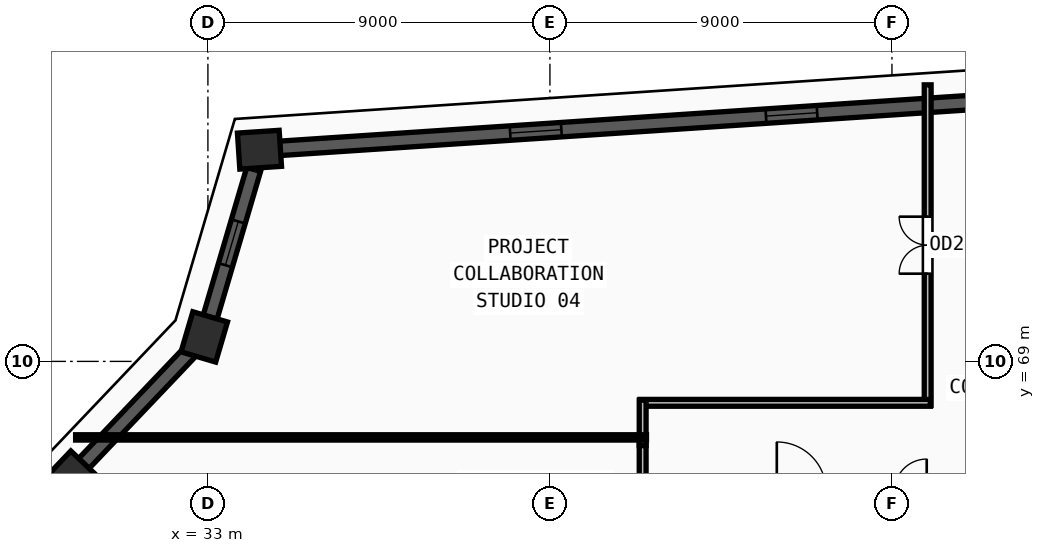
"""IFC4 building model, lengths in metres.
Left out: names, types, materials, properties, quantities, classifications, styles, units other than length and angle.
Written with IfcOpenShell. Run it as: python <this file> out.ifc"""

import sys

from ifc_helpers import new_model, si_unit, direction, frame, frame_2d, origin, origin_2d, place, context, subcontext, project, spatial, rectangle, extrude, source, transform, mapped, element, fill, save


model = new_model("IFC4")
c1 = context("Model", 3, precision=1e-05, world=origin(), true_north=direction((0.0, 1.0)))
c2 = subcontext(c1, "Body", "Model", "MODEL_VIEW")
j1 = project(units=[si_unit("LENGTHUNIT", "METRE"), si_unit("PLANEANGLEUNIT", "RADIAN")], contexts=[c1])
p1 = place(None, origin())
s1 = spatial("IfcSite", under=j1, at=p1, CompositionType="ELEMENT")
p2 = place(p1, origin())
s2 = spatial("IfcBuilding", under=s1, at=p2, CompositionType="ELEMENT")
p3 = place(p2, frame((0.0, 0.0, 286.5)))
s3 = spatial("IfcBuildingStorey", under=s2, at=p3, CompositionType="ELEMENT", Elevation=286.5)
m1 = source(origin(), c2, "Body", "SweptSolid", [
    extrude(rectangle(XDim=1.1, YDim=0.95, at=origin_2d()), origin(), (0.0, 0.0, 1.0), 3.75),
])
for number, where, z_axis, x_axis in (
    (1, (29.358, 65.917, 0.0), (0.0, 0.0, 1.0), (0.689, 0.724, 0.0)),
    (2, (32.904, 69.644, 0.0), (0.0, 0.0, 1.0), (0.283, 0.959, 0.0)),
    (3, (34.357, 74.57, 0.0), (0.0, 0.0, 1.0), (0.998, 0.066, 0.0)),
):
    element("IfcColumn", number, at=place(p3, frame(where, z_axis=z_axis, x_axis=x_axis)), inside=s3, PredefinedType="COLUMN", context=c2, shape_type="MappedRepresentation", body=[
        mapped(m1, transform((0.0, 0.0, 0.0), x_axis=(1.0, 0.0, 0.0), y_axis=(0.0, 1.0, 0.0), z_axis=(0.0, 0.0, 1.0), scale=1.0)),
    ])
p4 = place(p3, frame((61.821, 76.391, 0.0), z_axis=(0.0, 0.0, 1.0), x_axis=(-0.997809311933, -0.06615570285, 0.0)))
e4 = element("IfcWall", 4, at=p4, inside=s3, PredefinedType="SOLIDWALL", context=c2, shape_type="SweptSolid", body=[
    extrude(rectangle(XDim=26.984, YDim=0.38, at=frame_2d((13.492, 0.0))), origin(), (0.0, 0.0, 1.0), 3.57),
])
m2 = source(origin(), c2, "Body", "SweptSolid", [
    extrude(rectangle(XDim=1.35, YDim=1.85, at=frame_2d((0.675, 0.925))), frame((0.0, 0.2, 0.0), z_axis=(0.0, -1.0, 0.0), x_axis=(1.0, 0.0, 0.0)), (0.0, 0.0, 1.0), 0.4),
])
p5 = place(p4, frame((5.221, 0.0, 0.55)))
e5 = element("IfcOpeningElement", 5, at=p5, cuts=e4, PredefinedType="OPENING", context=c2, shape_type="MappedRepresentation", body=[
    mapped(m2, transform((0.0, 0.0, 0.0), x_axis=(1.0, 0.0, 0.0), y_axis=(0.0, 1.0, 0.0), z_axis=(0.0, 0.0, 1.0), scale=1.0)),
])
p6 = place(p4, frame((12.817, 0.0, 0.55)))
e6 = element("IfcOpeningElement", 6, at=p6, cuts=e4, PredefinedType="OPENING", context=c2, shape_type="MappedRepresentation", body=[
    mapped(m2, transform((0.0, 0.0, 0.0), x_axis=(1.0, 0.0, 0.0), y_axis=(0.0, 1.0, 0.0), z_axis=(0.0, 0.0, 1.0), scale=1.0)),
])
p7 = place(p4, frame((19.563, 0.0, 0.55)))
e7 = element("IfcOpeningElement", 7, at=p7, cuts=e4, PredefinedType="OPENING", context=c2, shape_type="MappedRepresentation", body=[
    mapped(m2, transform((0.0, 0.0, 0.0), x_axis=(1.0, 0.0, 0.0), y_axis=(0.0, 1.0, 0.0), z_axis=(0.0, 0.0, 1.0), scale=1.0)),
])
p8 = place(p3, frame((34.204, 74.052, 0.0), z_axis=(0.0, 0.0, 1.0), x_axis=(-0.28287675233, -0.9591562662, 0.0)))
e8 = element("IfcWall", 8, at=p8, inside=s3, PredefinedType="SOLIDWALL", context=c2, shape_type="SweptSolid", body=[
    extrude(rectangle(XDim=4.055, YDim=0.38, at=frame_2d((2.028, 0.0))), origin(), (0.0, 0.0, 1.0), 3.57),
])
m3 = source(origin(), c2, "Body", "SweptSolid", [
    extrude(rectangle(XDim=1.2, YDim=1.9, at=frame_2d((0.6, 0.95))), frame((0.0, 0.2, 0.0), z_axis=(0.0, -1.0, 0.0), x_axis=(1.0, 0.0, 0.0)), (0.0, 0.0, 1.0), 0.4),
])
p9 = place(p8, frame((1.428, 0.0, 0.55)))
e9 = element("IfcOpeningElement", 9, at=p9, cuts=e8, PredefinedType="OPENING", context=c2, shape_type="MappedRepresentation", body=[
    mapped(m3, transform((0.0, 0.0, 0.0), x_axis=(1.0, 0.0, 0.0), y_axis=(0.0, 1.0, 0.0), z_axis=(0.0, 0.0, 1.0), scale=1.0)),
])
p10 = place(p3, frame((32.532, 69.253, 0.0), z_axis=(0.0, 0.0, 1.0), x_axis=(-0.689320656659, -0.724456370186, 0.0)))
e10 = element("IfcWall", 10, at=p10, inside=s3, PredefinedType="SOLIDWALL", context=c2, shape_type="SweptSolid", body=[
    extrude(rectangle(XDim=4.065, YDim=0.38, at=frame_2d((2.032, 0.0))), origin(), (0.0, 0.0, 1.0), 3.57),
])
p11 = place(p3, frame((51.94, 67.84, 0.0), z_axis=(0.0, 0.0, 1.0), x_axis=(0.0, 1.0, 0.0)))
e11 = element("IfcWall", 11, at=p11, inside=s3, PredefinedType="PARTITIONING", context=c2, shape_type="SweptSolid", body=[
    extrude(rectangle(XDim=8.437, YDim=0.18, at=frame_2d((4.219, 0.0))), origin(), (0.0, 0.0, 1.0), 3.57),
])
m4 = source(origin(), c2, "Body", "SweptSolid", [
    extrude(rectangle(XDim=1.5, YDim=2.2, at=frame_2d((0.75, 1.1))), frame((0.0, 0.1, 0.0), z_axis=(0.0, -1.0, 0.0), x_axis=(1.0, 0.0, 0.0)), (0.0, 0.0, 1.0), 0.2),
])
p12 = place(p11, frame((3.468, 0.0, 0.0)))
e12 = element("IfcOpeningElement", 12, at=p12, cuts=e11, PredefinedType="OPENING", context=c2, shape_type="MappedRepresentation", body=[
    mapped(m4, transform((0.0, 0.0, 0.0), x_axis=(1.0, 0.0, 0.0), y_axis=(0.0, 1.0, 0.0), z_axis=(0.0, 0.0, 1.0), scale=1.0)),
])
p13 = place(p3, frame((44.37, 67.91, 0.0), z_axis=(0.0, 0.0, 1.0), x_axis=(1.0, 0.0, 0.0)))
e13 = element("IfcWall", 13, at=p13, inside=s3, PredefinedType="PARTITIONING", context=c2, shape_type="SweptSolid", body=[
    extrude(rectangle(XDim=7.64, YDim=0.18, at=frame_2d((3.82, 0.0))), origin(), (0.0, 0.0, 1.0), 3.57),
])
p14 = place(p3, frame((44.44, 66.785, 0.0), z_axis=(0.0, 0.0, 1.0), x_axis=(0.0, 1.0, 0.0)))
e14 = element("IfcWall", 14, at=p14, inside=s3, PredefinedType="PARTITIONING", context=c2, shape_type="SweptSolid", body=[
    extrude(rectangle(XDim=1.195, YDim=0.18, at=frame_2d((0.598, 0.0))), origin(), (0.0, 0.0, 1.0), 3.57),
])
p15 = place(p3, frame((44.44, 64.98, 0.0), z_axis=(0.0, 0.0, 1.0), x_axis=(0.0, 1.0, 0.0)))
e15 = element("IfcWall", 15, at=p15, inside=s3, PredefinedType="PARTITIONING", context=c2, shape_type="SweptSolid", body=[
    extrude(rectangle(XDim=1.805, YDim=0.18, at=frame_2d((0.902, 0.0))), origin(), (0.0, 0.0, 1.0), 3.57),
])
p16 = place(p3, frame((44.54, 67.0, 0.0), z_axis=(0.0, 0.0, 1.0), x_axis=(-1.0, 0.0, 0.0)))
e16 = element("IfcWall", 16, at=p16, inside=s3, PredefinedType="PARTITIONING", context=c2, shape_type="SweptSolid", body=[
    extrude(rectangle(XDim=15.021, YDim=0.14, at=frame_2d((7.51, 0.0))), origin(), (0.0, 0.0, 1.0), 3.57),
])
m5 = source(origin(), c2, "Body", "SweptSolid", [
    extrude(rectangle(XDim=1.35, YDim=1.85, at=frame_2d((0.675, 0.925))), frame((0.0, 0.03, 0.0), z_axis=(0.0, -1.0, 0.0), x_axis=(1.0, 0.0, 0.0)), (0.0, 0.0, 1.0), 0.06),
])
p17 = place(p6, origin())
e17 = element("IfcWindow", 17, at=p17, inside=s3, PartitioningType="SINGLE_PANEL", PredefinedType="WINDOW", context=c2, shape_type="MappedRepresentation", body=[
    mapped(m5, transform((0.0, 0.0, 0.0), x_axis=(1.0, 0.0, 0.0), y_axis=(0.0, 1.0, 0.0), z_axis=(0.0, 0.0, 1.0), scale=1.0)),
])
fill(e6, e17)
p18 = place(p7, origin())
e18 = element("IfcWindow", 18, at=p18, inside=s3, PartitioningType="SINGLE_PANEL", PredefinedType="WINDOW", context=c2, shape_type="MappedRepresentation", body=[
    mapped(m5, transform((0.0, 0.0, 0.0), x_axis=(1.0, 0.0, 0.0), y_axis=(0.0, 1.0, 0.0), z_axis=(0.0, 0.0, 1.0), scale=1.0)),
])
fill(e7, e18)
m6 = source(origin(), c2, "Body", "SweptSolid", [
    extrude(rectangle(XDim=1.2, YDim=1.9, at=frame_2d((0.6, 0.95))), frame((0.0, 0.03, 0.0), z_axis=(0.0, -1.0, 0.0), x_axis=(1.0, 0.0, 0.0)), (0.0, 0.0, 1.0), 0.06),
])
p19 = place(p9, origin())
e19 = element("IfcWindow", 19, at=p19, inside=s3, PartitioningType="SINGLE_PANEL", PredefinedType="WINDOW", context=c2, shape_type="MappedRepresentation", body=[
    mapped(m6, transform((0.0, 0.0, 0.0), x_axis=(1.0, 0.0, 0.0), y_axis=(0.0, 1.0, 0.0), z_axis=(0.0, 0.0, 1.0), scale=1.0)),
])
fill(e9, e19)
m7 = source(origin(), c2, "Body", "SweptSolid", [
    extrude(rectangle(XDim=1.5, YDim=2.2, at=frame_2d((0.75, 1.1))), frame((0.0, 0.025, 0.0), z_axis=(0.0, -1.0, 0.0), x_axis=(1.0, 0.0, 0.0)), (0.0, 0.0, 1.0), 0.05),
])
p20 = place(p12, origin())
e20 = element("IfcDoor", 20, at=p20, inside=s3, OperationType="DOUBLE_DOOR_SINGLE_SWING", PredefinedType="DOOR", context=c2, shape_type="MappedRepresentation", body=[
    mapped(m7, transform((0.0, 0.0, 0.0), x_axis=(1.0, 0.0, 0.0), y_axis=(0.0, 1.0, 0.0), z_axis=(0.0, 0.0, 1.0), scale=1.0)),
])
fill(e12, e20)
save(model, sys.argv[1])
